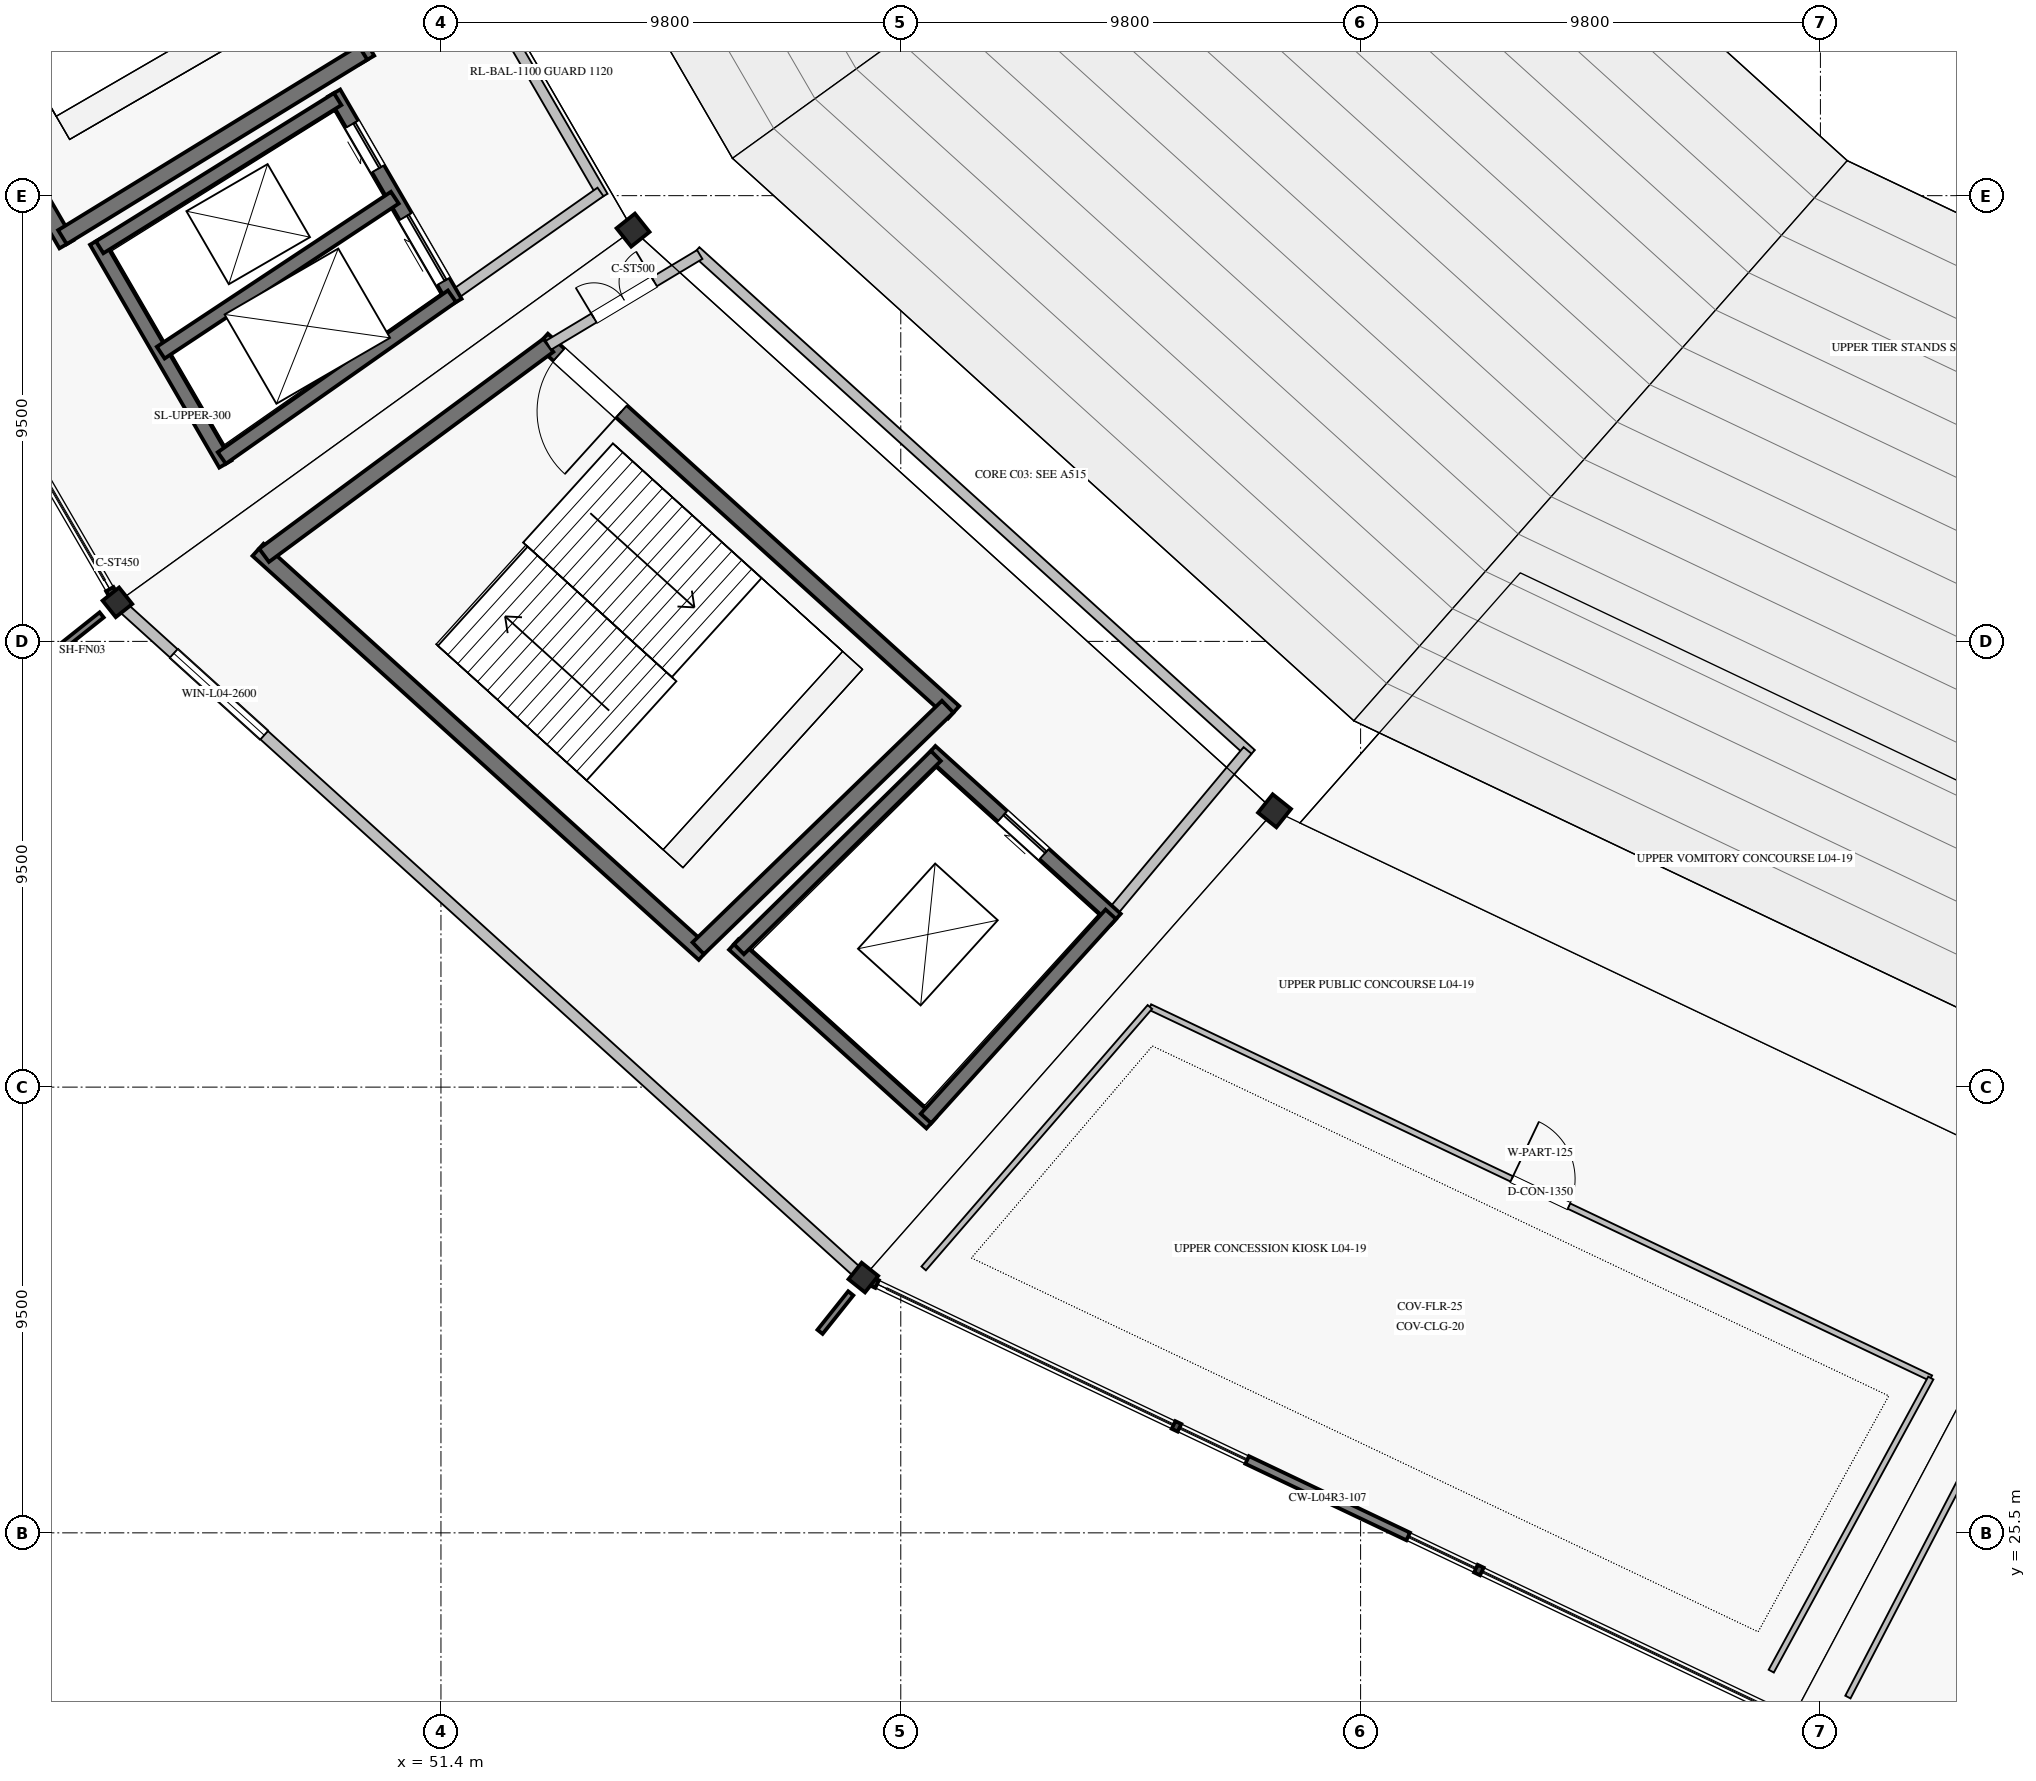
"""IFC4 building model, lengths in metres.
Left out: names, types, materials, properties, quantities, classifications, styles, units other than length and angle.
Written with IfcOpenShell. Run it as: python <this file> out.ifc"""

import sys

from ifc_helpers import new_model, si_unit, direction, frame, frame_2d, origin, origin_2d, place, context, subcontext, project, spatial, rectangle, hollow_rectangle, extrude, element, fill, save


model = new_model("IFC4")
c1 = context("Model", 3, precision=1e-05, world=origin(), true_north=direction((0.0, 1.0)))
c2 = subcontext(c1, "Body", "Model", "MODEL_VIEW")
j1 = project(units=[si_unit("LENGTHUNIT", "METRE"), si_unit("PLANEANGLEUNIT", "RADIAN")], contexts=[c1])
p1 = place(None, origin())
s1 = spatial("IfcSite", under=j1, at=p1, CompositionType="ELEMENT")
p2 = place(p1, origin())
s2 = spatial("IfcBuilding", under=s1, at=p2, CompositionType="ELEMENT")
p3 = place(p2, frame((0.0, 0.0, 20.4)))
s3 = spatial("IfcBuildingStorey", under=s2, at=p3, CompositionType="ELEMENT", Elevation=20.4)
for number, where, z_axis, x_axis in (
    (1, (55.494, 53.266, 0.0), (0.0, 0.0, 1.0), (-0.782, -0.623, 0.0)),
    (2, (69.166, 40.889, 0.0), (0.0, 0.0, 1.0), (-0.623, -0.782, 0.0)),
):
    element("IfcColumn", number, at=place(p3, frame(where, z_axis=z_axis, x_axis=x_axis)), inside=s3, PredefinedType="COLUMN", context=c2, shape_type="SweptSolid", body=[
        extrude(hollow_rectangle(XDim=0.5, YDim=0.5, WallThickness=0.022, at=origin_2d()), origin(), (0.0, 0.0, 1.0), 5.44),
    ])
for number, where, z_axis, x_axis in (
    (3, (44.505, 45.332, 0.0), (0.0, 0.0, 1.0), (-0.782, -0.623, 0.0)),
    (4, (60.402, 30.941, 0.0), (0.0, 0.0, 1.0), (-0.623, -0.782, 0.0)),
):
    element("IfcColumn", number, at=place(p3, frame(where, z_axis=z_axis, x_axis=x_axis)), inside=s3, PredefinedType="COLUMN", context=c2, shape_type="SweptSolid", body=[
        extrude(hollow_rectangle(XDim=0.45, YDim=0.45, WallThickness=0.022, at=origin_2d()), origin(), (0.0, 0.0, 1.0), 5.44),
    ])
p4 = place(p3, frame((44.668, 45.185, 0.0), z_axis=(0.0, 0.0, 1.0), x_axis=(0.741349049196, -0.671119651967, 0.0)))
e5 = element("IfcWall", 5, at=p4, inside=s3, PredefinedType="SOLIDWALL", context=c2, shape_type="SweptSolid", body=[
    extrude(rectangle(XDim=21.004, YDim=0.24, at=frame_2d((10.502, 0.0))), origin(), (0.0, 0.0, 1.0), 4.53),
])
p5 = place(p4, frame((1.4, 0.0, 1.0)))
e6 = element("IfcOpeningElement", 6, at=p5, cuts=e5, PredefinedType="OPENING", context=c2, shape_type="SweptSolid", body=[
    extrude(rectangle(XDim=2.6, YDim=1.8, at=frame_2d((1.3, 0.9))), frame((0.0, 0.13, 0.0), z_axis=(0.0, -1.0, 0.0), x_axis=(1.0, 0.0, 0.0)), (0.0, 0.0, 1.0), 0.26),
])
p6 = place(p3, frame((44.09, 66.788, 0.0), z_axis=(0.0, 0.0, 1.0), x_axis=(0.501628624814, -0.865083072755, 0.0)))
e7 = element("IfcWall", 7, at=p6, inside=s3, PredefinedType="SHEAR", context=c2, shape_type="SweptSolid", body=[
    extrude(rectangle(XDim=11.435, YDim=0.35, at=frame_2d((5.718, 0.0))), origin(), (0.0, 0.0, 1.0), 5.18),
])
p7 = place(p6, frame((0.475, 0.0, 0.0)))
e8 = element("IfcOpeningElement", 8, at=p7, cuts=e7, PredefinedType="OPENING", context=c2, shape_type="SweptSolid", body=[
    extrude(rectangle(XDim=1.8, YDim=2.2, at=frame_2d((0.9, 1.1))), frame((0.0, 0.185, 0.0), z_axis=(0.0, -1.0, 0.0), x_axis=(1.0, 0.0, 0.0)), (0.0, 0.0, 1.0), 0.37),
])
p8 = place(p3, frame((37.198, 63.695, 0.0), z_axis=(0.0, 0.0, 1.0), x_axis=(0.501601740165, -0.865098661577, 0.0)))
e9 = element("IfcWall", 9, at=p8, inside=s3, PredefinedType="SHEAR", context=c2, shape_type="SweptSolid", body=[
    extrude(rectangle(XDim=12.405, YDim=0.35, at=frame_2d((6.202, 0.0))), origin(), (0.0, 0.0, 1.0), 5.18),
])
p9 = place(p3, frame((49.739, 57.046, 0.0), z_axis=(0.0, 0.0, 1.0), x_axis=(-0.852334575619, -0.522996913188, 0.0)))
e10 = element("IfcWall", 10, at=p9, inside=s3, PredefinedType="SHEAR", context=c2, shape_type="SweptSolid", body=[
    extrude(rectangle(XDim=7.516, YDim=0.35, at=frame_2d((3.758, 0.0))), origin(), (0.0, 0.0, 1.0), 5.18),
])
p10 = place(p3, frame((49.123, 56.188, 0.0), z_axis=(0.0, 0.0, 1.0), x_axis=(0.501629534056, -0.86508254552, 0.0)))
e11 = element("IfcWall", 11, at=p10, inside=s3, PredefinedType="SHEAR", context=c2, shape_type="SweptSolid", body=[
    extrude(rectangle(XDim=5.157, YDim=0.3, at=frame_2d((2.579, 0.0))), origin(), (0.0, 0.0, 1.0), 5.18),
])
p11 = place(p10, frame((0.766, 0.0, 0.0)))
e12 = element("IfcOpeningElement", 12, at=p11, cuts=e11, PredefinedType="OPENING", context=c2, shape_type="SweptSolid", body=[
    extrude(rectangle(XDim=1.1, YDim=2.2, at=frame_2d((0.55, 1.1))), frame((0.0, 0.16, 0.0), z_axis=(0.0, -1.0, 0.0), x_axis=(1.0, 0.0, 0.0)), (0.0, 0.0, 1.0), 0.32),
])
p12 = place(p10, frame((3.042, 0.0, 0.0)))
e13 = element("IfcOpeningElement", 13, at=p12, cuts=e11, PredefinedType="OPENING", context=c2, shape_type="SweptSolid", body=[
    extrude(rectangle(XDim=1.6, YDim=2.3, at=frame_2d((0.8, 1.15))), frame((0.0, 0.16, 0.0), z_axis=(0.0, -1.0, 0.0), x_axis=(1.0, 0.0, 0.0)), (0.0, 0.0, 1.0), 0.32),
])
p13 = place(p3, frame((44.05, 53.03, 0.0), z_axis=(0.0, 0.0, 1.0), x_axis=(0.501596987756, -0.865101417103, 0.0)))
e14 = element("IfcWall", 14, at=p13, inside=s3, PredefinedType="SHEAR", context=c2, shape_type="SweptSolid", body=[
    extrude(rectangle(XDim=5.491, YDim=0.3, at=frame_2d((2.746, 0.0))), origin(), (0.0, 0.0, 1.0), 5.18),
])
p14 = place(p3, frame((49.198, 56.058, 0.0), z_axis=(0.0, 0.0, 1.0), x_axis=(-0.848938067893, -0.528492343257, 0.0)))
e15 = element("IfcWall", 15, at=p14, inside=s3, PredefinedType="SHEAR", context=c2, shape_type="SweptSolid", body=[
    extrude(rectangle(XDim=5.975, YDim=0.3, at=frame_2d((2.988, 0.0))), origin(), (0.0, 0.0, 1.0), 5.18),
])
p15 = place(p3, frame((51.635, 51.855, 0.0), z_axis=(0.0, 0.0, 1.0), x_axis=(-0.818205158105, -0.574926359851, 0.0)))
e16 = element("IfcWall", 16, at=p15, inside=s3, PredefinedType="SHEAR", context=c2, shape_type="SweptSolid", body=[
    extrude(rectangle(XDim=5.995, YDim=0.3, at=frame_2d((2.998, 0.0))), origin(), (0.0, 0.0, 1.0), 5.18),
])
p16 = place(p3, frame((50.417, 53.957, 0.0), z_axis=(0.0, 0.0, 1.0), x_axis=(-0.833878900042, -0.551947443209, 0.0)))
e17 = element("IfcWall", 17, at=p16, inside=s3, PredefinedType="SHEAR", context=c2, shape_type="SweptSolid", body=[
    extrude(rectangle(XDim=5.983, YDim=0.3, at=frame_2d((2.991, 0.0))), origin(), (0.0, 0.0, 1.0), 5.18),
])
p17 = place(p3, frame((46.774, 67.921, 0.0), z_axis=(0.0, 0.0, 1.0), x_axis=(0.501612626242, -0.865092349518, 0.0)))
e18 = element("IfcWall", 18, at=p17, inside=s3, PredefinedType="SOLIDWALL", context=c2, shape_type="SweptSolid", body=[
    extrude(rectangle(XDim=16.11, YDim=0.22, at=frame_2d((8.055, 0.0))), origin(), (0.0, 0.0, 1.0), 5.18),
])
p18 = place(p3, frame((54.8, 54.079, 0.0), z_axis=(0.0, 0.0, 1.0), x_axis=(-0.818225400643, -0.574897550649, 0.0)))
e19 = element("IfcWall", 19, at=p18, inside=s3, PredefinedType="SOLIDWALL", context=c2, shape_type="SweptSolid", body=[
    extrude(rectangle(XDim=3.868, YDim=0.22, at=frame_2d((1.934, 0.0))), origin(), (0.0, 0.0, 1.0), 5.18),
])
p19 = place(p3, frame((53.561, 50.928, 0.0), z_axis=(0.0, 0.0, 1.0), x_axis=(0.741358227035, -0.671109513572, 0.0)))
e20 = element("IfcWall", 20, at=p19, inside=s3, PredefinedType="SHEAR", context=c2, shape_type="SweptSolid", body=[
    extrude(rectangle(XDim=11.827, YDim=0.35, at=frame_2d((5.913, 0.0))), origin(), (0.0, 0.0, 1.0), 5.18),
])
p20 = place(p19, frame((0.475, 0.0, 0.0)))
e21 = element("IfcOpeningElement", 21, at=p20, cuts=e20, PredefinedType="OPENING", context=c2, shape_type="SweptSolid", body=[
    extrude(rectangle(XDim=1.8, YDim=2.2, at=frame_2d((0.9, 1.1))), frame((0.0, 0.185, 0.0), z_axis=(0.0, -1.0, 0.0), x_axis=(1.0, 0.0, 0.0)), (0.0, 0.0, 1.0), 0.37),
])
p21 = place(p3, frame((47.501, 46.452, 0.0), z_axis=(0.0, 0.0, 1.0), x_axis=(0.741351373721, -0.671117084183, 0.0)))
e22 = element("IfcWall", 22, at=p21, inside=s3, PredefinedType="SHEAR", context=c2, shape_type="SweptSolid", body=[
    extrude(rectangle(XDim=12.83, YDim=0.35, at=frame_2d((6.415, 0.0))), origin(), (0.0, 0.0, 1.0), 5.18),
])
p22 = place(p3, frame((53.691, 50.811, 0.0), z_axis=(0.0, 0.0, 1.0), x_axis=(-0.804395625347, -0.594093997548, 0.0)))
e23 = element("IfcWall", 23, at=p22, inside=s3, PredefinedType="SHEAR", context=c2, shape_type="SweptSolid", body=[
    extrude(rectangle(XDim=7.534, YDim=0.35, at=frame_2d((3.767, 0.0))), origin(), (0.0, 0.0, 1.0), 5.18),
])
p23 = place(p3, frame((62.199, 43.108, 0.0), z_axis=(0.0, 0.0, 1.0), x_axis=(-0.718297398554, -0.69573619083, 0.0)))
e24 = element("IfcWall", 24, at=p23, inside=s3, PredefinedType="SHEAR", context=c2, shape_type="SweptSolid", body=[
    extrude(rectangle(XDim=7.402, YDim=0.35, at=frame_2d((3.701, 0.0))), origin(), (0.0, 0.0, 1.0), 5.18),
])
p24 = place(p3, frame((61.837, 42.159, 0.0), z_axis=(0.0, 0.0, 1.0), x_axis=(0.741350155641, -0.671118429736, 0.0)))
e25 = element("IfcWall", 25, at=p24, inside=s3, PredefinedType="SHEAR", context=c2, shape_type="SweptSolid", body=[
    extrude(rectangle(XDim=5.329, YDim=0.3, at=frame_2d((2.665, 0.0))), origin(), (0.0, 0.0, 1.0), 5.18),
])
p25 = place(p24, frame((2.065, 0.0, 0.0)))
e26 = element("IfcOpeningElement", 26, at=p25, cuts=e25, PredefinedType="OPENING", context=c2, shape_type="SweptSolid", body=[
    extrude(rectangle(XDim=1.2, YDim=2.2, at=frame_2d((0.6, 1.1))), frame((0.0, 0.16, 0.0), z_axis=(0.0, -1.0, 0.0), x_axis=(1.0, 0.0, 0.0)), (0.0, 0.0, 1.0), 0.32),
])
p26 = place(p3, frame((57.64, 38.039, 0.0), z_axis=(0.0, 0.0, 1.0), x_axis=(0.74134208775, -0.671127341815, 0.0)))
e27 = element("IfcWall", 27, at=p26, inside=s3, PredefinedType="SHEAR", context=c2, shape_type="SweptSolid", body=[
    extrude(rectangle(XDim=5.675, YDim=0.3, at=frame_2d((2.837, 0.0))), origin(), (0.0, 0.0, 1.0), 5.18),
])
p27 = place(p3, frame((61.948, 42.059, 0.0), z_axis=(0.0, 0.0, 1.0), x_axis=(-0.713553028001, -0.700601224828, 0.0)))
e28 = element("IfcWall", 28, at=p27, inside=s3, PredefinedType="SHEAR", context=c2, shape_type="SweptSolid", body=[
    extrude(rectangle(XDim=5.881, YDim=0.3, at=frame_2d((2.94, 0.0))), origin(), (0.0, 0.0, 1.0), 5.18),
])
p28 = place(p3, frame((65.676, 38.684, 0.0), z_axis=(0.0, 0.0, 1.0), x_axis=(-0.67115829282, -0.741314067031, 0.0)))
e29 = element("IfcWall", 29, at=p28, inside=s3, PredefinedType="SHEAR", context=c2, shape_type="SweptSolid", body=[
    extrude(rectangle(XDim=5.871, YDim=0.3, at=frame_2d((2.935, 0.0))), origin(), (0.0, 0.0, 1.0), 5.18),
])
p29 = place(p3, frame((56.834, 52.819, 0.0), z_axis=(0.0, 0.0, 1.0), x_axis=(0.741351035574, -0.671117457717, 0.0)))
e30 = element("IfcWall", 30, at=p29, inside=s3, PredefinedType="SOLIDWALL", context=c2, shape_type="SweptSolid", body=[
    extrude(rectangle(XDim=15.969, YDim=0.22, at=frame_2d((7.985, 0.0))), origin(), (0.0, 0.0, 1.0), 5.18),
])
p30 = place(p3, frame((56.915, 52.746, 0.0), z_axis=(0.0, 0.0, 1.0), x_axis=(-0.857424171966, -0.514610327654, 0.0)))
e31 = element("IfcWall", 31, at=p30, inside=s3, PredefinedType="SOLIDWALL", context=c2, shape_type="SweptSolid", body=[
    extrude(rectangle(XDim=3.76, YDim=0.22, at=frame_2d((1.88, 0.0))), origin(), (0.0, 0.0, 1.0), 5.18),
])
p31 = place(p30, frame((1.13, 0.0, 0.0)))
e32 = element("IfcOpeningElement", 32, at=p31, cuts=e31, PredefinedType="OPENING", context=c2, shape_type="SweptSolid", body=[
    extrude(rectangle(XDim=1.5, YDim=2.2, at=frame_2d((0.75, 1.1))), frame((0.0, 0.12, 0.0), z_axis=(0.0, -1.0, 0.0), x_axis=(1.0, 0.0, 0.0)), (0.0, 0.0, 1.0), 0.24),
])
p32 = place(p3, frame((68.591, 42.176, 0.0), z_axis=(0.0, 0.0, 1.0), x_axis=(-0.640759627034, -0.767741558315, 0.0)))
e33 = element("IfcWall", 33, at=p32, inside=s3, PredefinedType="SOLIDWALL", context=c2, shape_type="SweptSolid", body=[
    extrude(rectangle(XDim=4.549, YDim=0.22, at=frame_2d((2.274, 0.0))), origin(), (0.0, 0.0, 1.0), 5.18),
])
p33 = place(p3, frame((66.509, 36.708, 0.0), z_axis=(0.0, 0.0, 1.0), x_axis=(0.90321677741, -0.429184637429, 0.0)))
e34 = element("IfcWall", 34, at=p33, inside=s3, PredefinedType="PARTITIONING", context=c2, shape_type="SweptSolid", body=[
    extrude(rectangle(XDim=18.427, YDim=0.125, at=frame_2d((9.214, 0.0))), origin(), (0.0, 0.0, 1.0), 4.5),
])
p34 = place(p33, frame((8.539, 0.0, 0.0)))
e35 = element("IfcOpeningElement", 35, at=p34, cuts=e34, PredefinedType="OPENING", context=c2, shape_type="SweptSolid", body=[
    extrude(rectangle(XDim=1.35, YDim=2.15, at=frame_2d((0.675, 1.075))), frame((0.0, 0.073, 0.0), z_axis=(0.0, -1.0, 0.0), x_axis=(1.0, 0.0, 0.0)), (0.0, 0.0, 1.0), 0.145),
])
p35 = place(p3, frame((66.509, 36.708, 0.0), z_axis=(0.0, 0.0, 1.0), x_axis=(-0.654288201841, -0.7562452968, 0.0)))
e36 = element("IfcWall", 36, at=p35, inside=s3, PredefinedType="PARTITIONING", context=c2, shape_type="SweptSolid", body=[
    extrude(rectangle(XDim=7.368, YDim=0.125, at=frame_2d((3.684, 0.0))), origin(), (0.0, 0.0, 1.0), 4.5),
])
p36 = place(p3, frame((83.153, 28.8, 0.0), z_axis=(0.0, 0.0, 1.0), x_axis=(-0.47812325427, -0.878292749444, 0.0)))
e37 = element("IfcWall", 37, at=p36, inside=s3, PredefinedType="PARTITIONING", context=c2, shape_type="SweptSolid", body=[
    extrude(rectangle(XDim=7.113, YDim=0.125, at=frame_2d((3.556, 0.0))), origin(), (0.0, 0.0, 1.0), 4.5),
])
p37 = place(p3, frame((84.658, 28.29, 0.0), z_axis=(0.0, 0.0, 1.0), x_axis=(-0.461466568794, -0.887157599238, 0.0)))
e38 = element("IfcWall", 38, at=p37, inside=s3, PredefinedType="PARTITIONING", context=c2, shape_type="SweptSolid", body=[
    extrude(rectangle(XDim=7.09, YDim=0.125, at=frame_2d((3.545, 0.0))), origin(), (0.0, 0.0, 1.0), 4.5),
])
p38 = place(p5, origin())
e39 = element("IfcWindow", 39, at=p38, inside=s3, PartitioningType="SINGLE_PANEL", PredefinedType="WINDOW", context=c2, shape_type="SweptSolid", body=[
    extrude(rectangle(XDim=2.6, YDim=1.8, at=frame_2d((1.3, 0.9))), frame((0.0, 0.03, 0.0), z_axis=(0.0, -1.0, 0.0), x_axis=(1.0, 0.0, 0.0)), (0.0, 0.0, 1.0), 0.06),
])
fill(e6, e39)
p39 = place(p11, origin())
e40 = element("IfcDoor", 40, at=p39, inside=s3, OperationType="SLIDING_TO_RIGHT", PredefinedType="DOOR", context=c2, shape_type="SweptSolid", body=[
    extrude(rectangle(XDim=1.1, YDim=2.2, at=frame_2d((0.55, 1.1))), frame((0.0, 0.025, 0.0), z_axis=(0.0, -1.0, 0.0), x_axis=(1.0, 0.0, 0.0)), (0.0, 0.0, 1.0), 0.05),
])
fill(e12, e40)
p40 = place(p12, origin())
e41 = element("IfcDoor", 41, at=p40, inside=s3, OperationType="SLIDING_TO_LEFT", PredefinedType="DOOR", context=c2, shape_type="SweptSolid", body=[
    extrude(rectangle(XDim=1.6, YDim=2.3, at=frame_2d((0.8, 1.15))), frame((0.0, 0.025, 0.0), z_axis=(0.0, -1.0, 0.0), x_axis=(1.0, 0.0, 0.0)), (0.0, 0.0, 1.0), 0.05),
])
fill(e13, e41)
p41 = place(p20, frame((1.8, 0.0, 0.0), z_axis=(0.0, 0.0, 1.0), x_axis=(-1.0, 0.0, 0.0)))
e42 = element("IfcDoor", 42, at=p41, inside=s3, OperationType="SINGLE_SWING_LEFT", PredefinedType="DOOR", context=c2, shape_type="SweptSolid", body=[
    extrude(rectangle(XDim=1.8, YDim=2.2, at=frame_2d((0.9, 1.1))), frame((0.0, 0.025, 0.0), z_axis=(0.0, -1.0, 0.0), x_axis=(1.0, 0.0, 0.0)), (0.0, 0.0, 1.0), 0.05),
])
fill(e21, e42)
p42 = place(p25, origin())
e43 = element("IfcDoor", 43, at=p42, inside=s3, OperationType="SLIDING_TO_LEFT", PredefinedType="DOOR", context=c2, shape_type="SweptSolid", body=[
    extrude(rectangle(XDim=1.2, YDim=2.2, at=frame_2d((0.6, 1.1))), frame((0.0, 0.025, 0.0), z_axis=(0.0, -1.0, 0.0), x_axis=(1.0, 0.0, 0.0)), (0.0, 0.0, 1.0), 0.05),
])
fill(e26, e43)
p43 = place(p31, frame((1.5, 0.0, 0.0), z_axis=(0.0, 0.0, 1.0), x_axis=(-1.0, 0.0, 0.0)))
e44 = element("IfcDoor", 44, at=p43, inside=s3, OperationType="DOUBLE_DOOR_SINGLE_SWING", PredefinedType="DOOR", context=c2, shape_type="SweptSolid", body=[
    extrude(rectangle(XDim=1.5, YDim=2.2, at=frame_2d((0.75, 1.1))), frame((0.0, 0.025, 0.0), z_axis=(0.0, -1.0, 0.0), x_axis=(1.0, 0.0, 0.0)), (0.0, 0.0, 1.0), 0.05),
])
fill(e32, e44)
p44 = place(p34, origin())
e45 = element("IfcDoor", 45, at=p44, inside=s3, OperationType="SINGLE_SWING_LEFT", PredefinedType="DOOR", context=c2, shape_type="SweptSolid", body=[
    extrude(rectangle(XDim=1.35, YDim=2.15, at=frame_2d((0.675, 1.075))), frame((0.0, 0.025, 0.0), z_axis=(0.0, -1.0, 0.0), x_axis=(1.0, 0.0, 0.0)), (0.0, 0.0, 1.0), 0.05),
])
fill(e35, e45)
save(model, sys.argv[1])
